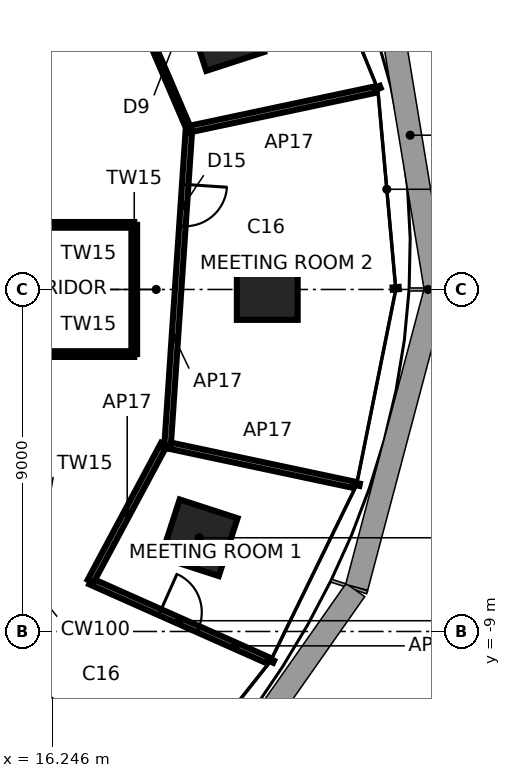
"""IFC4 building model, lengths in metres.
Left out: names, types, materials, properties, quantities, classifications, styles, units other than length and angle.
Written with IfcOpenShell. Run it as: python <this file> out.ifc"""

import sys

from ifc_helpers import new_model, si_unit, direction, frame, frame_2d, origin, origin_2d, place, context, subcontext, project, spatial, rectangle, extrude, element, fill, save


model = new_model("IFC4")
c1 = context("Model", 3, precision=1e-05, world=origin(), true_north=direction((0.0, 1.0)))
c2 = subcontext(c1, "Body", "Model", "MODEL_VIEW")
j1 = project(units=[si_unit("LENGTHUNIT", "METRE"), si_unit("PLANEANGLEUNIT", "RADIAN")], contexts=[c1])
p1 = place(None, origin())
s1 = spatial("IfcSite", under=j1, at=p1, CompositionType="ELEMENT")
p2 = place(p1, origin())
s2 = spatial("IfcBuilding", under=s1, at=p2, CompositionType="ELEMENT")
p3 = place(p2, frame((0.0, 0.0, 127.5)))
s3 = spatial("IfcBuildingStorey", under=s2, at=p3, CompositionType="ELEMENT", Elevation=127.5)
for number, where, z_axis, x_axis in (
    (1, (21.9, 0.0, 0.0), (0.0, 0.0, 1.0), (1.0, 0.0, 0.0)),
    (2, (20.808, 6.761, 0.0), (0.0, 0.0, 1.0), (0.951, 0.309, 0.0)),
    (3, (16.315, -11.854, 0.0), (0.0, 0.0, 1.0), (0.809, -0.588, 0.0)),
    (4, (20.109, -6.534, 0.0), (0.0, 0.0, 1.0), (0.951, -0.309, 0.0)),
):
    element("IfcColumn", number, at=place(p3, frame(where, z_axis=z_axis, x_axis=x_axis)), inside=s3, PredefinedType="COLUMN", context=c2, shape_type="SweptSolid", body=[
        extrude(rectangle(XDim=1.6, YDim=1.6, at=origin_2d()), origin(), (0.0, 0.0, 1.0), 3.9),
    ])
p4 = place(p3, frame((17.25, -7.68, 0.0), z_axis=(0.0, 0.0, 1.0), x_axis=(0.913540908219, -0.406746861095, 0.0)))
e5 = element("IfcWall", 5, at=p4, inside=s3, PredefinedType="PARTITIONING", context=c2, shape_type="SweptSolid", body=[
    extrude(rectangle(XDim=5.1, YDim=0.17, at=frame_2d((2.55, 0.0))), origin(), (0.0, 0.0, 1.0), 3.74),
])
p5 = place(p4, frame((2.0, 0.0, 0.0)))
e6 = element("IfcOpeningElement", 6, at=p5, cuts=e5, PredefinedType="OPENING", context=c2, shape_type="SweptSolid", body=[
    extrude(rectangle(XDim=1.1, YDim=2.4, at=frame_2d((0.55, 1.2))), frame((0.0, 0.095, 0.0), z_axis=(0.0, -1.0, 0.0), x_axis=(1.0, 0.0, 0.0)), (0.0, 0.0, 1.0), 0.19),
])
p6 = place(p3, frame((19.179, -4.077, 0.0), z_axis=(0.0, 0.0, 1.0), x_axis=(-0.472146825295, -0.881519923407, 0.0)))
e7 = element("IfcWall", 7, at=p6, inside=s3, PredefinedType="PARTITIONING", context=c2, shape_type="SweptSolid", body=[
    extrude(rectangle(XDim=4.088, YDim=0.17, at=frame_2d((2.044, 0.0))), origin(), (0.0, 0.0, 1.0), 3.74),
])
p7 = place(p3, frame((19.277, -4.097, 0.0), z_axis=(0.0, 0.0, 1.0), x_axis=(-0.978158850918, 0.20785875582, 0.0)))
e8 = element("IfcWall", 8, at=p7, inside=s3, PredefinedType="PARTITIONING", context=c2, shape_type="SweptSolid", body=[
    extrude(rectangle(XDim=0.1, YDim=0.17, at=frame_2d((0.05, 0.0))), origin(), (0.0, 0.0, 1.0), 3.74),
])
p8 = place(p3, frame((19.277, -4.097, 0.0), z_axis=(0.0, 0.0, 1.0), x_axis=(0.978149046495, -0.207904888932, 0.0)))
e9 = element("IfcWall", 9, at=p8, inside=s3, PredefinedType="PARTITIONING", context=c2, shape_type="SweptSolid", body=[
    extrude(rectangle(XDim=5.0, YDim=0.17, at=frame_2d((2.5, 0.0))), origin(), (0.0, 0.0, 1.0), 3.74),
])
p9 = place(p3, frame((16.0, -1.7, 0.0), z_axis=(0.0, 0.0, 1.0), x_axis=(1.0, 0.0, 0.0)))
e10 = element("IfcWall", 10, at=p9, inside=s3, PredefinedType="PARTITIONING", context=c2, shape_type="SweptSolid", body=[
    extrude(rectangle(XDim=2.4, YDim=0.15, at=frame_2d((1.2, 0.0))), origin(), (0.0, 0.0, 1.0), 3.74),
])
p10 = place(p3, frame((18.4, -1.7, 0.0), z_axis=(0.0, 0.0, 1.0), x_axis=(0.0, 1.0, 0.0)))
e11 = element("IfcWall", 11, at=p10, inside=s3, PredefinedType="PARTITIONING", context=c2, shape_type="SweptSolid", body=[
    extrude(rectangle(XDim=3.4, YDim=0.15, at=frame_2d((1.7, 0.0))), origin(), (0.0, 0.0, 1.0), 3.74),
])
p11 = place(p3, frame((19.84, 4.217, 0.0), z_axis=(0.0, 0.0, 1.0), x_axis=(-0.067498983032, -0.997719342947, 0.0)))
e12 = element("IfcWall", 12, at=p11, inside=s3, PredefinedType="PARTITIONING", context=c2, shape_type="SweptSolid", body=[
    extrude(rectangle(XDim=8.333, YDim=0.17, at=frame_2d((4.167, 0.0))), origin(), (0.0, 0.0, 1.0), 3.74),
])
p12 = place(p11, frame((1.456, 0.0, 0.0)))
e13 = element("IfcOpeningElement", 13, at=p12, cuts=e12, PredefinedType="OPENING", context=c2, shape_type="SweptSolid", body=[
    extrude(rectangle(XDim=1.1, YDim=2.4, at=frame_2d((0.55, 1.2))), frame((0.0, 0.095, 0.0), z_axis=(0.0, -1.0, 0.0), x_axis=(1.0, 0.0, 0.0)), (0.0, 0.0, 1.0), 0.19),
])
p13 = place(p3, frame((18.4, 1.7, 0.0), z_axis=(0.0, 0.0, 1.0), x_axis=(-1.0, 0.0, 0.0)))
e14 = element("IfcWall", 14, at=p13, inside=s3, PredefinedType="PARTITIONING", context=c2, shape_type="SweptSolid", body=[
    extrude(rectangle(XDim=2.4, YDim=0.15, at=frame_2d((1.2, 0.0))), origin(), (0.0, 0.0, 1.0), 3.74),
])
p14 = place(p3, frame((24.73, 5.257, 0.0), z_axis=(0.0, 0.0, 1.0), x_axis=(-0.978149046495, -0.207904888932, 0.0)))
e15 = element("IfcWall", 15, at=p14, inside=s3, PredefinedType="PARTITIONING", context=c2, shape_type="SweptSolid", body=[
    extrude(rectangle(XDim=5.0, YDim=0.17, at=frame_2d((2.5, 0.0))), origin(), (0.0, 0.0, 1.0), 3.74),
])
p15 = place(p3, frame((18.175, 8.092, 0.0), z_axis=(0.0, 0.0, 1.0), x_axis=(0.394806421401, -0.918764327573, 0.0)))
e16 = element("IfcWall", 16, at=p15, inside=s3, PredefinedType="PARTITIONING", context=c2, shape_type="SweptSolid", body=[
    extrude(rectangle(XDim=4.217, YDim=0.12, at=frame_2d((2.109, 0.0))), origin(), (0.0, 0.0, 1.0), 3.74),
])
p16 = place(p5, origin())
e17 = element("IfcDoor", 17, at=p16, inside=s3, OperationType="SINGLE_SWING_LEFT", PredefinedType="DOOR", context=c2, shape_type="SweptSolid", body=[
    extrude(rectangle(XDim=1.1, YDim=2.4, at=frame_2d((0.55, 1.2))), frame((0.0, 0.025, 0.0), z_axis=(0.0, -1.0, 0.0), x_axis=(1.0, 0.0, 0.0)), (0.0, 0.0, 1.0), 0.05),
])
fill(e6, e17)
p17 = place(p12, origin())
e18 = element("IfcDoor", 18, at=p17, inside=s3, OperationType="SINGLE_SWING_LEFT", PredefinedType="DOOR", context=c2, shape_type="SweptSolid", body=[
    extrude(rectangle(XDim=1.1, YDim=2.4, at=frame_2d((0.55, 1.2))), frame((0.0, 0.025, 0.0), z_axis=(0.0, -1.0, 0.0), x_axis=(1.0, 0.0, 0.0)), (0.0, 0.0, 1.0), 0.05),
])
fill(e13, e18)
save(model, sys.argv[1])
